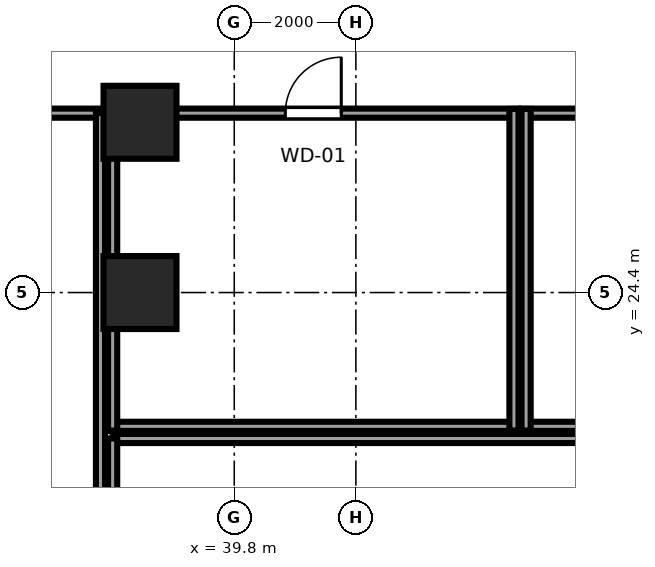
"""IFC4 building model, lengths in metres.
Left out: names, types, materials, properties, quantities, classifications, styles, units other than length and angle.
Written with IfcOpenShell. Run it as: python <this file> out.ifc"""

import sys

from ifc_helpers import new_model, si_unit, direction, frame, frame_2d, origin, origin_2d, place, context, subcontext, project, spatial, rectangle, extrude, source, transform, mapped, element, fill, save


model = new_model("IFC4")
c1 = context("Model", 3, precision=1e-05, world=origin(), true_north=direction((0.0, 1.0)))
c2 = subcontext(c1, "Body", "Model", "MODEL_VIEW")
j1 = project(units=[si_unit("LENGTHUNIT", "METRE"), si_unit("PLANEANGLEUNIT", "RADIAN")], contexts=[c1])
p1 = place(None, origin())
s1 = spatial("IfcSite", under=j1, at=p1, CompositionType="ELEMENT")
p2 = place(p1, origin())
s2 = spatial("IfcBuilding", under=s1, at=p2, CompositionType="ELEMENT")
p3 = place(p2, frame((0.0, 0.0, 26.8)))
s3 = spatial("IfcBuildingStorey", under=s2, at=p3, CompositionType="ELEMENT", Elevation=26.8)
m1 = source(origin(), c2, "Body", "SweptSolid", [
    extrude(rectangle(XDim=1.2, YDim=1.2, at=origin_2d()), origin(), (0.0, 0.0, 1.0), 5.2),
])
for number, where, z_axis, x_axis in (
    (1, (38.25, 24.4, 0.0), (0.0, 0.0, 1.0), (1.0, 0.0, 0.0)),
    (2, (38.25, 27.2, 0.0), (0.0, 0.0, 1.0), (1.0, 0.0, 0.0)),
):
    element("IfcColumn", number, at=place(p3, frame(where, z_axis=z_axis, x_axis=x_axis)), inside=s3, PredefinedType="COLUMN", context=c2, shape_type="MappedRepresentation", body=[
        mapped(m1, transform((0.0, 0.0, 0.0), x_axis=(1.0, 0.0, 0.0), y_axis=(0.0, 1.0, 0.0), z_axis=(0.0, 0.0, 1.0), scale=1.0)),
    ])
p4 = place(p3, frame((28.2, 27.35, 0.0), z_axis=(0.0, 0.0, 1.0), x_axis=(1.0, 0.0, 0.0)))
e3 = element("IfcWall", 3, at=p4, inside=s3, PredefinedType="PARTITIONING", context=c2, shape_type="SweptSolid", body=[
    extrude(rectangle(XDim=9.4, YDim=0.15, at=frame_2d((4.7, 0.0))), origin(), (0.0, 0.0, 1.0), 4.94),
])
p5 = place(p4, frame((3.875, 0.0, 0.0)))
e4 = element("IfcOpeningElement", 4, at=p5, cuts=e3, PredefinedType="OPENING", context=c2, shape_type="SweptSolid", body=[
    extrude(rectangle(XDim=1.65, YDim=2.15, at=frame_2d((0.825, 1.075))), frame((0.0, 0.085, 0.0), z_axis=(0.0, -1.0, 0.0), x_axis=(1.0, 0.0, 0.0)), (0.0, 0.0, 1.0), 0.17),
])
p6 = place(p3, frame((37.6, -2.025, 0.0), z_axis=(0.0, 0.0, 1.0), x_axis=(0.0, 1.0, 0.0)))
e5 = element("IfcWall", 5, at=p6, inside=s3, PredefinedType="PARTITIONING", context=c2, shape_type="SweptSolid", body=[
    extrude(rectangle(XDim=29.375, YDim=0.15, at=frame_2d((14.688, 0.0))), origin(), (0.0, 0.0, 1.0), 4.94),
])
p7 = place(p3, frame((37.8, 22.0, 0.0), z_axis=(0.0, 0.0, 1.0), x_axis=(1.0, 0.0, 0.0)))
e6 = element("IfcWall", 6, at=p7, inside=s3, PredefinedType="PARTITIONING", context=c2, shape_type="SweptSolid", body=[
    extrude(rectangle(XDim=10.2, YDim=0.15, at=frame_2d((5.1, 0.0))), origin(), (0.0, 0.0, 1.0), 4.94),
])
p8 = place(p3, frame((37.8, -2.025, 0.0), z_axis=(0.0, 0.0, 1.0), x_axis=(0.0, 1.0, 0.0)))
e7 = element("IfcWall", 7, at=p8, inside=s3, PredefinedType="PARTITIONING", context=c2, shape_type="SweptSolid", body=[
    extrude(rectangle(XDim=24.025, YDim=0.15, at=frame_2d((12.012, 0.0))), origin(), (0.0, 0.0, 1.0), 4.94),
])
p9 = place(p3, frame((37.73, 22.2, 0.0), z_axis=(0.0, 0.0, 1.0), x_axis=(1.0, 0.0, 0.0)))
e8 = element("IfcWall", 8, at=p9, inside=s3, PredefinedType="PARTITIONING", context=c2, shape_type="SweptSolid", body=[
    extrude(rectangle(XDim=6.74, YDim=0.15, at=frame_2d((3.37, 0.0))), origin(), (0.0, 0.0, 1.0), 4.94),
])
p10 = place(p3, frame((37.73, 27.35, 0.0), z_axis=(0.0, 0.0, 1.0), x_axis=(1.0, 0.0, 0.0)))
e9 = element("IfcWall", 9, at=p10, inside=s3, PredefinedType="PARTITIONING", context=c2, shape_type="SweptSolid", body=[
    extrude(rectangle(XDim=6.74, YDim=0.15, at=frame_2d((3.37, 0.0))), origin(), (0.0, 0.0, 1.0), 4.94),
])
p11 = place(p10, frame((2.91, 0.0, 0.0)))
e10 = element("IfcOpeningElement", 10, at=p11, cuts=e9, PredefinedType="OPENING", context=c2, shape_type="SweptSolid", body=[
    extrude(rectangle(XDim=0.92, YDim=2.01, at=frame_2d((0.46, 1.005))), frame((0.0, 0.085, 0.0), z_axis=(0.0, -1.0, 0.0), x_axis=(1.0, 0.0, 0.0)), (0.0, 0.0, 1.0), 0.17),
])
for number, where, z_axis, x_axis in (
    (11, (37.8, 22.13, 0.0), (0.0, 0.0, 1.0), (0.0, 1.0, 0.0)),
    (12, (44.4, 22.13, 0.0), (0.0, 0.0, 1.0), (0.0, 1.0, 0.0)),
):
    element("IfcWall", number, at=place(p3, frame(where, z_axis=z_axis, x_axis=x_axis)), inside=s3, PredefinedType="PARTITIONING", context=c2, shape_type="SweptSolid", body=[
        extrude(rectangle(XDim=5.29, YDim=0.15, at=frame_2d((2.645, 0.0))), origin(), (0.0, 0.0, 1.0), 4.94),
    ])
p12 = place(p3, frame((44.53, 22.2, 0.0), z_axis=(0.0, 0.0, 1.0), x_axis=(1.0, 0.0, 0.0)))
e13 = element("IfcWall", 13, at=p12, inside=s3, PredefinedType="PARTITIONING", context=c2, shape_type="SweptSolid", body=[
    extrude(rectangle(XDim=3.54, YDim=0.15, at=frame_2d((1.77, 0.0))), origin(), (0.0, 0.0, 1.0), 4.94),
])
p13 = place(p3, frame((44.53, 27.35, 0.0), z_axis=(0.0, 0.0, 1.0), x_axis=(1.0, 0.0, 0.0)))
e14 = element("IfcWall", 14, at=p13, inside=s3, PredefinedType="PARTITIONING", context=c2, shape_type="SweptSolid", body=[
    extrude(rectangle(XDim=3.54, YDim=0.15, at=frame_2d((1.77, 0.0))), origin(), (0.0, 0.0, 1.0), 4.94),
])
p14 = place(p13, frame((1.31, 0.0, 0.0)))
e15 = element("IfcOpeningElement", 15, at=p14, cuts=e14, PredefinedType="OPENING", context=c2, shape_type="SweptSolid", body=[
    extrude(rectangle(XDim=0.92, YDim=2.01, at=frame_2d((0.46, 1.005))), frame((0.0, 0.085, 0.0), z_axis=(0.0, -1.0, 0.0), x_axis=(1.0, 0.0, 0.0)), (0.0, 0.0, 1.0), 0.17),
])
p15 = place(p3, frame((44.6, 22.13, 0.0), z_axis=(0.0, 0.0, 1.0), x_axis=(0.0, 1.0, 0.0)))
e16 = element("IfcWall", 16, at=p15, inside=s3, PredefinedType="PARTITIONING", context=c2, shape_type="SweptSolid", body=[
    extrude(rectangle(XDim=5.29, YDim=0.15, at=frame_2d((2.645, 0.0))), origin(), (0.0, 0.0, 1.0), 4.94),
])
m2 = source(origin(), c2, "Body", "SweptSolid", [
    extrude(rectangle(XDim=0.92, YDim=2.01, at=frame_2d((0.46, 1.005))), frame((0.0, 0.025, 0.0), z_axis=(0.0, -1.0, 0.0), x_axis=(1.0, 0.0, 0.0)), (0.0, 0.0, 1.0), 0.05),
])
p16 = place(p11, origin())
e17 = element("IfcDoor", 17, at=p16, inside=s3, OperationType="SINGLE_SWING_RIGHT", PredefinedType="DOOR", context=c2, shape_type="MappedRepresentation", body=[
    mapped(m2, transform((0.0, 0.0, 0.0), x_axis=(1.0, 0.0, 0.0), y_axis=(0.0, 1.0, 0.0), z_axis=(0.0, 0.0, 1.0), scale=1.0)),
])
fill(e10, e17)
save(model, sys.argv[1])
